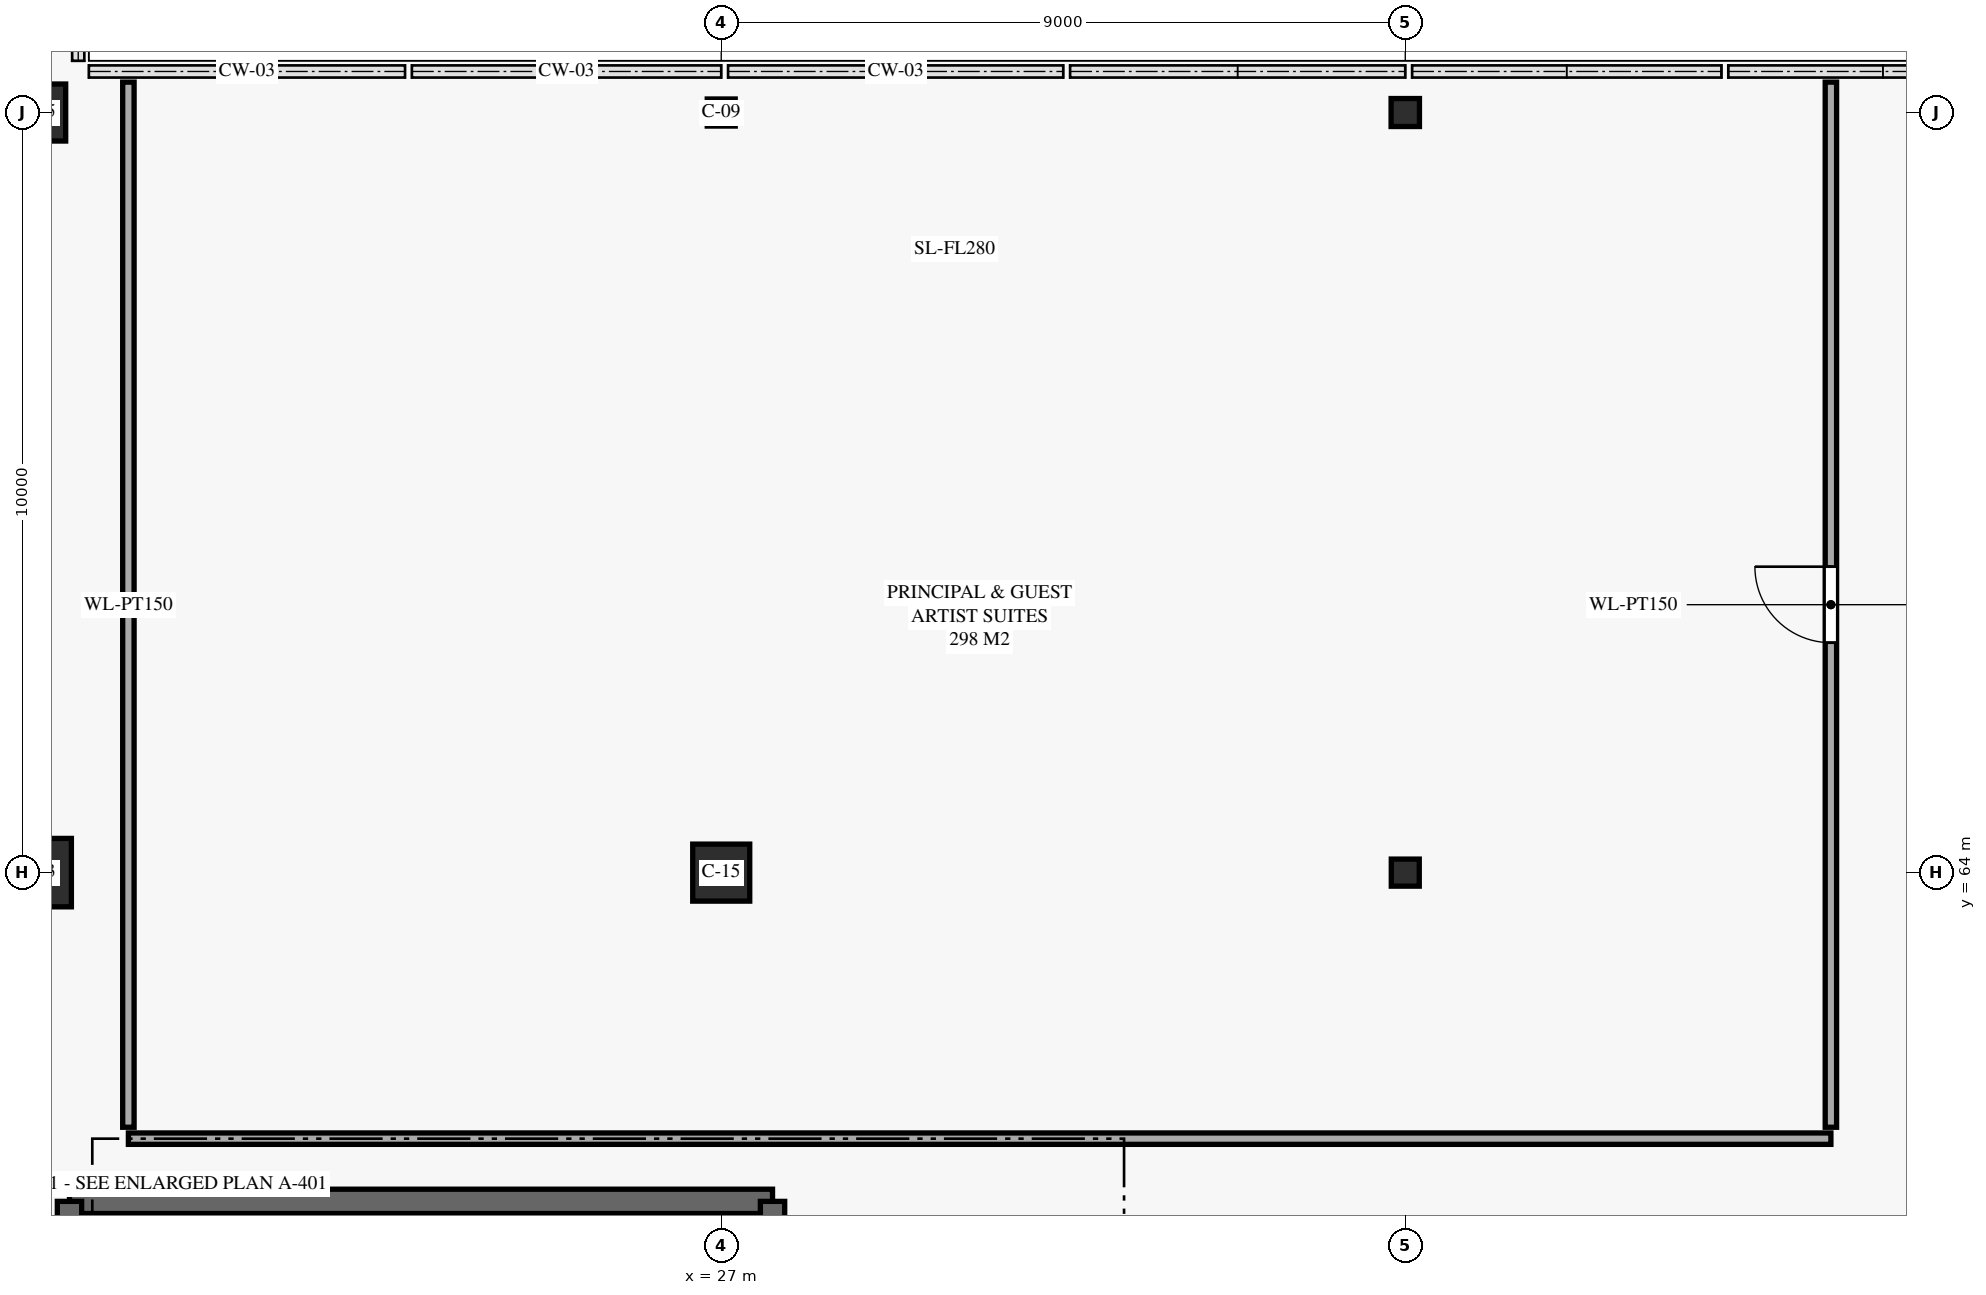
"""IFC4 building model, lengths in metres.
Left out: names, types, materials, properties, quantities, classifications, styles, units other than length and angle.
Written with IfcOpenShell. Run it as: python <this file> out.ifc"""

import sys

from ifc_helpers import new_model, si_unit, direction, frame, frame_2d, origin, origin_2d, place, context, subcontext, project, spatial, rectangle, i_section, extrude, element, fill, save


model = new_model("IFC4")
c1 = context("Model", 3, precision=1e-05, world=origin(), true_north=direction((0.0, 1.0)))
c2 = subcontext(c1, "Body", "Model", "MODEL_VIEW")
j1 = project(units=[si_unit("LENGTHUNIT", "METRE"), si_unit("PLANEANGLEUNIT", "RADIAN")], contexts=[c1])
p1 = place(None, origin())
s1 = spatial("IfcSite", under=j1, at=p1, CompositionType="ELEMENT")
p2 = place(p1, origin())
s2 = spatial("IfcBuilding", under=s1, at=p2, CompositionType="ELEMENT")
p3 = place(p2, frame((0.0, 0.0, 10.0)))
s3 = spatial("IfcBuildingStorey", under=s2, at=p3, CompositionType="ELEMENT", Elevation=10.0)
p4 = place(p3, frame((18.0, 64.0, 0.0), z_axis=(0.0, 0.0, 1.0), x_axis=(1.0, 0.0, 0.0)))
e1 = element("IfcColumn", 1, at=p4, inside=s3, PredefinedType="COLUMN", context=c2, shape_type="SweptSolid", body=[
    extrude(rectangle(XDim=0.9, YDim=0.9, at=origin_2d()), origin(), (0.0, 0.0, 1.0), 5.0),
])
for number, where, z_axis, x_axis in (
    (2, (18.0, 74.0, 0.0), (0.0, 0.0, 1.0), (1.0, 0.0, 0.0)),
    (3, (27.0, 64.0, 0.0), (0.0, 0.0, 1.0), (1.0, 0.0, 0.0)),
):
    element("IfcColumn", number, at=place(p3, frame(where, z_axis=z_axis, x_axis=x_axis)), inside=s3, PredefinedType="COLUMN", context=c2, shape_type="SweptSolid", body=[
        extrude(rectangle(XDim=0.75, YDim=0.75, at=origin_2d()), origin(), (0.0, 0.0, 1.0), 5.0),
    ])
for number, where, z_axis, x_axis in (
    (4, (27.0, 74.0, 0.0), (0.0, 0.0, 1.0), (1.0, 0.0, 0.0)),
    (5, (36.0, 64.0, 0.0), (0.0, 0.0, 1.0), (1.0, 0.0, 0.0)),
):
    element("IfcColumn", number, at=place(p3, frame(where, z_axis=z_axis, x_axis=x_axis)), inside=s3, PredefinedType="COLUMN", context=c2, shape_type="SweptSolid", body=[
        extrude(i_section(OverallWidth=0.368, OverallDepth=0.356, WebThickness=0.011, FlangeThickness=0.018, FilletRadius=0.015, at=origin_2d()), origin(), (0.0, 0.0, 1.0), 5.0),
    ])
p5 = place(p3, frame((36.0, 74.0, 0.0), z_axis=(0.0, 0.0, 1.0), x_axis=(1.0, 0.0, 0.0)))
e6 = element("IfcColumn", 6, at=p5, inside=s3, PredefinedType="COLUMN", context=c2, shape_type="SweptSolid", body=[
    extrude(i_section(OverallWidth=0.373, OverallDepth=0.368, WebThickness=0.015, FlangeThickness=0.024, FilletRadius=0.015, at=origin_2d()), origin(), (0.0, 0.0, 1.0), 5.0),
])
p6 = place(p3, frame((27.675, 59.675, 0.0), z_axis=(0.0, 0.0, 1.0), x_axis=(-1.0, 0.0, 0.0)))
e7 = element("IfcWall", 7, at=p6, inside=s3, PredefinedType="SHEAR", context=c2, shape_type="SweptSolid", body=[
    extrude(rectangle(XDim=9.25, YDim=0.32, at=frame_2d((4.625, 0.0))), origin(), (0.0, 0.0, 1.0), 4.72),
])
p7 = place(p3, frame((18.425, 59.675, 0.0), z_axis=(0.0, 0.0, 1.0), x_axis=(0.0, -1.0, 0.0)))
e8 = element("IfcWall", 8, at=p7, inside=s3, PredefinedType="SHEAR", context=c2, shape_type="SweptSolid", body=[
    extrude(rectangle(XDim=5.05, YDim=0.32, at=frame_2d((2.525, 0.0))), origin(), (0.0, 0.0, 1.0), 4.72),
])
p8 = place(p7, frame((1.85, 0.0, 0.0)))
e9 = element("IfcOpeningElement", 9, at=p8, cuts=e8, PredefinedType="OPENING", context=c2, shape_type="SweptSolid", body=[
    extrude(rectangle(XDim=1.15, YDim=2.2, at=frame_2d((0.575, 1.1))), frame((0.0, 0.17, 0.0), z_axis=(0.0, -1.0, 0.0), x_axis=(1.0, 0.0, 0.0)), (0.0, 0.0, 1.0), 0.34),
])
p9 = place(p3, frame((27.675, 54.625, 0.0), z_axis=(0.0, 0.0, 1.0), x_axis=(0.0, 1.0, 0.0)))
e10 = element("IfcWall", 10, at=p9, inside=s3, PredefinedType="SHEAR", context=c2, shape_type="SweptSolid", body=[
    extrude(rectangle(XDim=5.05, YDim=0.32, at=frame_2d((2.525, 0.0))), origin(), (0.0, 0.0, 1.0), 4.72),
])
p10 = place(p3, frame((19.2, 60.5, 0.0), z_axis=(0.0, 0.0, 1.0), x_axis=(1.0, 0.0, 0.0)))
e11 = element("IfcWall", 11, at=p10, inside=s3, PredefinedType="PARTITIONING", context=c2, shape_type="SweptSolid", body=[
    extrude(rectangle(XDim=22.4, YDim=0.15, at=frame_2d((11.2, 0.0))), origin(), (0.0, 0.0, 1.0), 4.72),
])
p11 = place(p3, frame((19.2, 74.4, 0.0), z_axis=(0.0, 0.0, 1.0), x_axis=(0.0, -1.0, 0.0)))
e12 = element("IfcWall", 12, at=p11, inside=s3, PredefinedType="PARTITIONING", context=c2, shape_type="SweptSolid", body=[
    extrude(rectangle(XDim=13.75, YDim=0.15, at=frame_2d((6.875, 0.0))), origin(), (0.0, 0.0, 1.0), 4.72),
])
p12 = place(p3, frame((41.6, 60.65, 0.0), z_axis=(0.0, 0.0, 1.0), x_axis=(0.0, 1.0, 0.0)))
e13 = element("IfcWall", 13, at=p12, inside=s3, PredefinedType="PARTITIONING", context=c2, shape_type="SweptSolid", body=[
    extrude(rectangle(XDim=13.75, YDim=0.15, at=frame_2d((6.875, 0.0))), origin(), (0.0, 0.0, 1.0), 4.72),
])
p13 = place(p12, frame((6.375, 0.0, 0.0)))
e14 = element("IfcOpeningElement", 14, at=p13, cuts=e13, PredefinedType="OPENING", context=c2, shape_type="SweptSolid", body=[
    extrude(rectangle(XDim=1.0, YDim=2.15, at=frame_2d((0.5, 1.075))), frame((0.0, 0.085, 0.0), z_axis=(0.0, -1.0, 0.0), x_axis=(1.0, 0.0, 0.0)), (0.0, 0.0, 1.0), 0.17),
])
p14 = place(p13, origin())
e15 = element("IfcDoor", 15, at=p14, inside=s3, OperationType="SINGLE_SWING_RIGHT", PredefinedType="DOOR", context=c2, shape_type="SweptSolid", body=[
    extrude(rectangle(XDim=1.0, YDim=2.15, at=frame_2d((0.5, 1.075))), frame((0.0, 0.025, 0.0), z_axis=(0.0, -1.0, 0.0), x_axis=(1.0, 0.0, 0.0)), (0.0, 0.0, 1.0), 0.05),
])
fill(e14, e15)
save(model, sys.argv[1])
